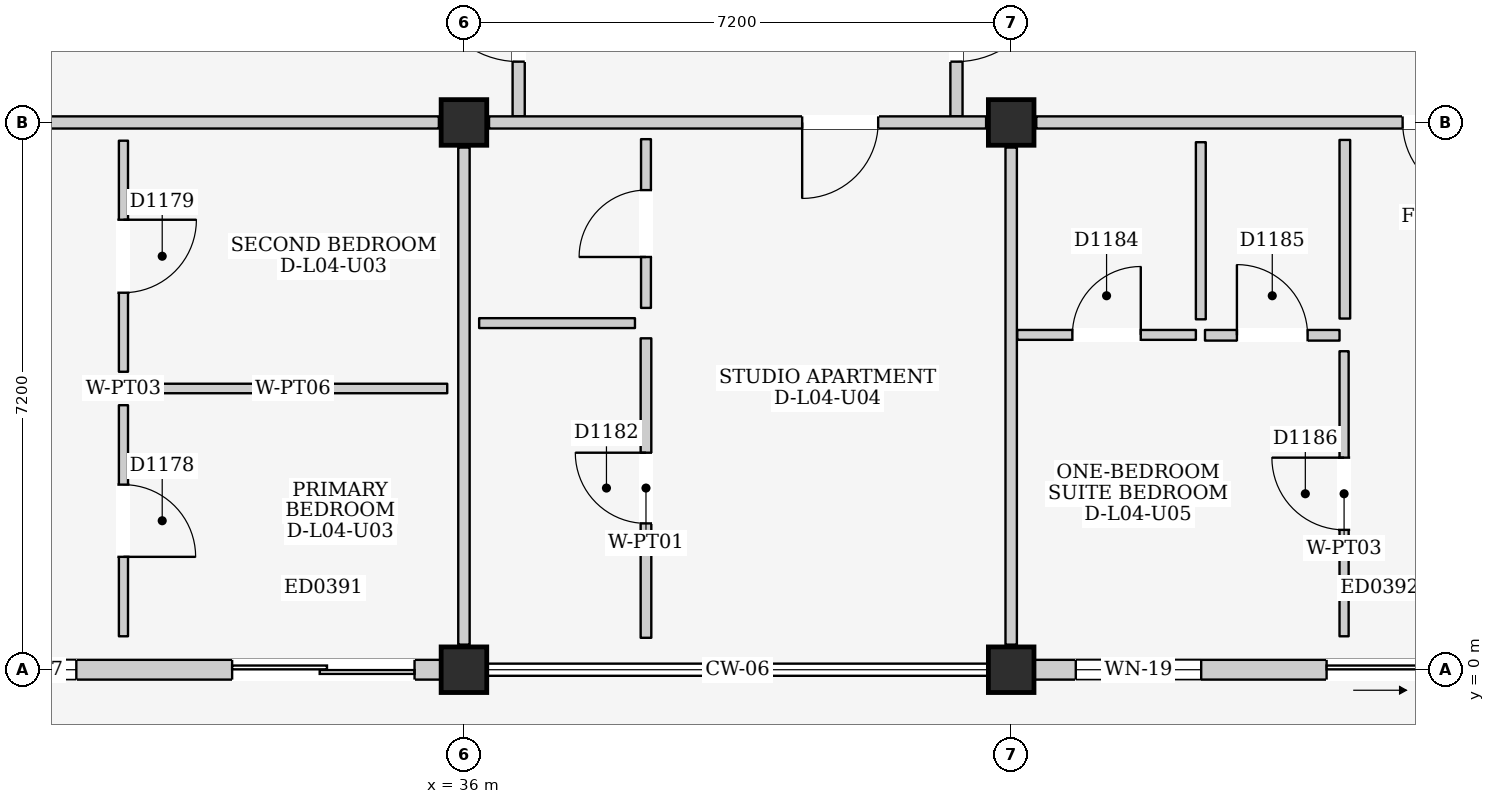
"""IFC4 building model, lengths in metres.
Left out: names, types, materials, properties, quantities, classifications, styles, units other than length and angle.
Written with IfcOpenShell. Run it as: python <this file> out.ifc"""

import sys

from ifc_helpers import new_model, si_unit, direction, frame, frame_2d, origin, origin_2d, place, context, subcontext, project, spatial, rectangle, extrude, element, fill, save


model = new_model("IFC4")
c1 = context("Model", 3, precision=1e-05, world=origin(), true_north=direction((0.0, 1.0)))
c2 = subcontext(c1, "Body", "Model", "MODEL_VIEW")
j1 = project(units=[si_unit("LENGTHUNIT", "METRE"), si_unit("PLANEANGLEUNIT", "RADIAN")], contexts=[c1])
p1 = place(None, origin())
s1 = spatial("IfcSite", under=j1, at=p1, CompositionType="ELEMENT")
p2 = place(p1, origin())
s2 = spatial("IfcBuilding", under=s1, at=p2, CompositionType="ELEMENT")
p3 = place(p2, frame((0.0, 0.0, 15.4)))
s3 = spatial("IfcBuildingStorey", under=s2, at=p3, CompositionType="ELEMENT", Elevation=15.4)
for number, where, z_axis, x_axis in (
    (1, (36.0, 0.0, 0.0), (0.0, 0.0, 1.0), (1.0, 0.0, 0.0)),
    (2, (36.0, 7.2, 0.0), (0.0, 0.0, 1.0), (1.0, 0.0, 0.0)),
    (3, (43.2, 0.0, 0.0), (0.0, 0.0, 1.0), (1.0, 0.0, 0.0)),
    (4, (43.2, 7.2, 0.0), (0.0, 0.0, 1.0), (1.0, 0.0, 0.0)),
):
    element("IfcColumn", number, at=place(p3, frame(where, z_axis=z_axis, x_axis=x_axis)), inside=s3, PredefinedType="COLUMN", context=c2, shape_type="SweptSolid", body=[
        extrude(rectangle(XDim=0.6, YDim=0.6, at=origin_2d()), origin(), (0.0, 0.0, 1.0), 3.2),
    ])
p4 = place(p3, frame((29.1, 0.0, 0.0), z_axis=(0.0, 0.0, 1.0), x_axis=(1.0, 0.0, 0.0)))
e5 = element("IfcWall", 5, at=p4, inside=s3, PredefinedType="ELEMENTEDWALL", context=c2, shape_type="SweptSolid", body=[
    extrude(rectangle(XDim=6.6, YDim=0.26, at=frame_2d((3.3, 0.0))), origin(), (0.0, 0.0, 1.0), 2.43),
])
p5 = place(p4, frame((3.85, 0.0, 0.0)))
e6 = element("IfcOpeningElement", 6, at=p5, cuts=e5, PredefinedType="OPENING", context=c2, shape_type="SweptSolid", body=[
    extrude(rectangle(XDim=2.4, YDim=2.12, at=frame_2d((1.2, 1.06))), frame((0.0, 0.145, 0.0), z_axis=(0.0, -1.0, 0.0), x_axis=(1.0, 0.0, 0.0)), (0.0, 0.0, 1.0), 0.29),
])
p6 = place(p4, frame((0.55, 0.0, 0.9)))
e7 = element("IfcOpeningElement", 7, at=p6, cuts=e5, PredefinedType="OPENING", context=c2, shape_type="SweptSolid", body=[
    extrude(rectangle(XDim=1.25, YDim=1.3, at=frame_2d((0.625, 0.65))), frame((0.0, 0.145, 0.0), z_axis=(0.0, -1.0, 0.0), x_axis=(1.0, 0.0, 0.0)), (0.0, 0.0, 1.0), 0.29),
])
p7 = place(p3, frame((43.5, 0.0, 0.0), z_axis=(0.0, 0.0, 1.0), x_axis=(1.0, 0.0, 0.0)))
e8 = element("IfcWall", 8, at=p7, inside=s3, PredefinedType="ELEMENTEDWALL", context=c2, shape_type="SweptSolid", body=[
    extrude(rectangle(XDim=6.6, YDim=0.26, at=frame_2d((3.3, 0.0))), origin(), (0.0, 0.0, 1.0), 2.43),
])
p8 = place(p7, frame((3.85, 0.0, 0.0)))
e9 = element("IfcOpeningElement", 9, at=p8, cuts=e8, PredefinedType="OPENING", context=c2, shape_type="SweptSolid", body=[
    extrude(rectangle(XDim=1.4, YDim=2.1, at=frame_2d((0.7, 1.05))), frame((0.0, 0.145, 0.0), z_axis=(0.0, -1.0, 0.0), x_axis=(1.0, 0.0, 0.0)), (0.0, 0.0, 1.0), 0.29),
])
p9 = place(p7, frame((0.55, 0.0, 0.9)))
e10 = element("IfcOpeningElement", 10, at=p9, cuts=e8, PredefinedType="OPENING", context=c2, shape_type="SweptSolid", body=[
    extrude(rectangle(XDim=1.65, YDim=1.35, at=frame_2d((0.825, 0.675))), frame((0.0, 0.145, 0.0), z_axis=(0.0, -1.0, 0.0), x_axis=(1.0, 0.0, 0.0)), (0.0, 0.0, 1.0), 0.29),
])
p10 = place(p3, frame((36.72, 7.28, 0.0), z_axis=(0.0, 0.0, 1.0), x_axis=(0.0, 1.0, 0.0)))
e11 = element("IfcWall", 11, at=p10, inside=s3, PredefinedType="PARTITIONING", context=c2, shape_type="SweptSolid", body=[
    extrude(rectangle(XDim=4.32, YDim=0.16, at=frame_2d((2.16, 0.0))), origin(), (0.0, 0.0, 1.0), 2.95),
])
p11 = place(p10, frame((0.72, 0.0, 0.0)))
e12 = element("IfcOpeningElement", 12, at=p11, cuts=e11, PredefinedType="OPENING", context=c2, shape_type="SweptSolid", body=[
    extrude(rectangle(XDim=1.2, YDim=2.2, at=frame_2d((0.6, 1.1))), frame((0.0, 0.095, 0.0), z_axis=(0.0, -1.0, 0.0), x_axis=(1.0, 0.0, 0.0)), (0.0, 0.0, 1.0), 0.19),
])
p12 = place(p3, frame((42.48, 7.28, 0.0), z_axis=(0.0, 0.0, 1.0), x_axis=(0.0, 1.0, 0.0)))
e13 = element("IfcWall", 13, at=p12, inside=s3, PredefinedType="PARTITIONING", context=c2, shape_type="SweptSolid", body=[
    extrude(rectangle(XDim=4.32, YDim=0.16, at=frame_2d((2.16, 0.0))), origin(), (0.0, 0.0, 1.0), 2.95),
])
p13 = place(p12, frame((0.72, 0.0, 0.0)))
e14 = element("IfcOpeningElement", 14, at=p13, cuts=e13, PredefinedType="OPENING", context=c2, shape_type="SweptSolid", body=[
    extrude(rectangle(XDim=1.2, YDim=2.2, at=frame_2d((0.6, 1.1))), frame((0.0, 0.095, 0.0), z_axis=(0.0, -1.0, 0.0), x_axis=(1.0, 0.0, 0.0)), (0.0, 0.0, 1.0), 0.19),
])
p14 = place(p3, frame((29.13, 7.2, 0.0), z_axis=(0.0, 0.0, 1.0), x_axis=(1.0, 0.0, 0.0)))
e15 = element("IfcWall", 15, at=p14, inside=s3, PredefinedType="PARTITIONING", context=c2, shape_type="SweptSolid", body=[
    extrude(rectangle(XDim=6.54, YDim=0.16, at=frame_2d((3.27, 0.0))), origin(), (0.0, 0.0, 1.0), 2.335),
])
p15 = place(p14, frame((0.18, 0.0, 0.0)))
e16 = element("IfcOpeningElement", 16, at=p15, cuts=e15, PredefinedType="OPENING", context=c2, shape_type="SweptSolid", body=[
    extrude(rectangle(XDim=1.0, YDim=2.15, at=frame_2d((0.5, 1.075))), frame((0.0, 0.095, 0.0), z_axis=(0.0, -1.0, 0.0), x_axis=(1.0, 0.0, 0.0)), (0.0, 0.0, 1.0), 0.19),
])
p16 = place(p3, frame((36.0, 0.33, 0.0), z_axis=(0.0, 0.0, 1.0), x_axis=(0.0, 1.0, 0.0)))
e17 = element("IfcWall", 17, at=p16, inside=s3, PredefinedType="PARTITIONING", context=c2, shape_type="SweptSolid", body=[
    extrude(rectangle(XDim=6.54, YDim=0.15, at=frame_2d((3.27, 0.0))), origin(), (0.0, 0.0, 1.0), 2.385),
])
p17 = place(p3, frame((31.52, 0.44, 0.0), z_axis=(0.0, 0.0, 1.0), x_axis=(0.0, 1.0, 0.0)))
e18 = element("IfcWall", 18, at=p17, inside=s3, PredefinedType="PARTITIONING", context=c2, shape_type="SweptSolid", body=[
    extrude(rectangle(XDim=3.04, YDim=0.12, at=frame_2d((1.52, 0.0))), origin(), (0.0, 0.0, 1.0), 2.95),
])
p18 = place(p17, frame((1.045, 0.0, 0.0)))
e19 = element("IfcOpeningElement", 19, at=p18, cuts=e18, PredefinedType="OPENING", context=c2, shape_type="SweptSolid", body=[
    extrude(rectangle(XDim=0.95, YDim=2.15, at=frame_2d((0.475, 1.075))), frame((0.0, 0.075, 0.0), z_axis=(0.0, -1.0, 0.0), x_axis=(1.0, 0.0, 0.0)), (0.0, 0.0, 1.0), 0.15),
])
p19 = place(p3, frame((31.72, 3.7, 0.0), z_axis=(0.0, 0.0, 1.0), x_axis=(1.0, 0.0, 0.0)))
e20 = element("IfcWall", 20, at=p19, inside=s3, PredefinedType="PARTITIONING", context=c2, shape_type="SweptSolid", body=[
    extrude(rectangle(XDim=4.06, YDim=0.125, at=frame_2d((2.03, 0.0))), origin(), (0.0, 0.0, 1.0), 2.95),
])
p20 = place(p3, frame((31.52, 3.92, 0.0), z_axis=(0.0, 0.0, 1.0), x_axis=(0.0, 1.0, 0.0)))
e21 = element("IfcWall", 21, at=p20, inside=s3, PredefinedType="PARTITIONING", context=c2, shape_type="SweptSolid", body=[
    extrude(rectangle(XDim=3.04, YDim=0.12, at=frame_2d((1.52, 0.0))), origin(), (0.0, 0.0, 1.0), 2.95),
])
p21 = place(p20, frame((1.04, 0.0, 0.0)))
e22 = element("IfcOpeningElement", 22, at=p21, cuts=e21, PredefinedType="OPENING", context=c2, shape_type="SweptSolid", body=[
    extrude(rectangle(XDim=0.96, YDim=2.15, at=frame_2d((0.48, 1.075))), frame((0.0, 0.075, 0.0), z_axis=(0.0, -1.0, 0.0), x_axis=(1.0, 0.0, 0.0)), (0.0, 0.0, 1.0), 0.15),
])
p22 = place(p3, frame((36.33, 7.2, 0.0), z_axis=(0.0, 0.0, 1.0), x_axis=(1.0, 0.0, 0.0)))
e23 = element("IfcWall", 23, at=p22, inside=s3, PredefinedType="PARTITIONING", context=c2, shape_type="SweptSolid", body=[
    extrude(rectangle(XDim=6.54, YDim=0.16, at=frame_2d((3.27, 0.0))), origin(), (0.0, 0.0, 1.0), 2.335),
])
p23 = place(p22, frame((4.12, 0.0, 0.0)))
e24 = element("IfcOpeningElement", 24, at=p23, cuts=e23, PredefinedType="OPENING", context=c2, shape_type="SweptSolid", body=[
    extrude(rectangle(XDim=1.0, YDim=2.15, at=frame_2d((0.5, 1.075))), frame((0.0, 0.095, 0.0), z_axis=(0.0, -1.0, 0.0), x_axis=(1.0, 0.0, 0.0)), (0.0, 0.0, 1.0), 0.19),
])
p24 = place(p3, frame((43.2, 0.33, 0.0), z_axis=(0.0, 0.0, 1.0), x_axis=(0.0, 1.0, 0.0)))
e25 = element("IfcWall", 25, at=p24, inside=s3, PredefinedType="PARTITIONING", context=c2, shape_type="SweptSolid", body=[
    extrude(rectangle(XDim=6.54, YDim=0.15, at=frame_2d((3.27, 0.0))), origin(), (0.0, 0.0, 1.0), 2.385),
])
p25 = place(p3, frame((36.2, 4.56, 0.0), z_axis=(0.0, 0.0, 1.0), x_axis=(1.0, 0.0, 0.0)))
e26 = element("IfcWall", 26, at=p25, inside=s3, PredefinedType="PARTITIONING", context=c2, shape_type="SweptSolid", body=[
    extrude(rectangle(XDim=2.05, YDim=0.13, at=frame_2d((1.025, 0.0))), origin(), (0.0, 0.0, 1.0), 2.95),
])
p26 = place(p3, frame((38.395, 4.76, 0.0), z_axis=(0.0, 0.0, 1.0), x_axis=(0.0, 1.0, 0.0)))
e27 = element("IfcWall", 27, at=p26, inside=s3, PredefinedType="PARTITIONING", context=c2, shape_type="SweptSolid", body=[
    extrude(rectangle(XDim=2.22, YDim=0.13, at=frame_2d((1.11, 0.0))), origin(), (0.0, 0.0, 1.0), 2.95),
])
p27 = place(p26, frame((0.67, 0.0, 0.0)))
e28 = element("IfcOpeningElement", 28, at=p27, cuts=e27, PredefinedType="OPENING", context=c2, shape_type="SweptSolid", body=[
    extrude(rectangle(XDim=0.88, YDim=2.1, at=frame_2d((0.44, 1.05))), frame((0.0, 0.08, 0.0), z_axis=(0.0, -1.0, 0.0), x_axis=(1.0, 0.0, 0.0)), (0.0, 0.0, 1.0), 0.16),
])
p28 = place(p3, frame((38.395, 0.42, 0.0), z_axis=(0.0, 0.0, 1.0), x_axis=(0.0, 1.0, 0.0)))
e29 = element("IfcWall", 29, at=p28, inside=s3, PredefinedType="PARTITIONING", context=c2, shape_type="SweptSolid", body=[
    extrude(rectangle(XDim=3.94, YDim=0.14, at=frame_2d((1.97, 0.0))), origin(), (0.0, 0.0, 1.0), 2.95),
])
p29 = place(p28, frame((1.505, 0.0, 0.0)))
e30 = element("IfcOpeningElement", 30, at=p29, cuts=e29, PredefinedType="OPENING", context=c2, shape_type="SweptSolid", body=[
    extrude(rectangle(XDim=0.93, YDim=2.14, at=frame_2d((0.465, 1.07))), frame((0.0, 0.085, 0.0), z_axis=(0.0, -1.0, 0.0), x_axis=(1.0, 0.0, 0.0)), (0.0, 0.0, 1.0), 0.17),
])
p30 = place(p3, frame((43.53, 7.2, 0.0), z_axis=(0.0, 0.0, 1.0), x_axis=(1.0, 0.0, 0.0)))
e31 = element("IfcWall", 31, at=p30, inside=s3, PredefinedType="PARTITIONING", context=c2, shape_type="SweptSolid", body=[
    extrude(rectangle(XDim=6.54, YDim=0.16, at=frame_2d((3.27, 0.0))), origin(), (0.0, 0.0, 1.0), 2.335),
])
p31 = place(p30, frame((4.82, 0.0, 0.0)))
e32 = element("IfcOpeningElement", 32, at=p31, cuts=e31, PredefinedType="OPENING", context=c2, shape_type="SweptSolid", body=[
    extrude(rectangle(XDim=1.0, YDim=2.15, at=frame_2d((0.5, 1.075))), frame((0.0, 0.095, 0.0), z_axis=(0.0, -1.0, 0.0), x_axis=(1.0, 0.0, 0.0)), (0.0, 0.0, 1.0), 0.19),
])
p32 = place(p3, frame((43.28, 4.405, 0.0), z_axis=(0.0, 0.0, 1.0), x_axis=(1.0, 0.0, 0.0)))
e33 = element("IfcWall", 33, at=p32, inside=s3, PredefinedType="PARTITIONING", context=c2, shape_type="SweptSolid", body=[
    extrude(rectangle(XDim=2.35, YDim=0.13, at=frame_2d((1.175, 0.0))), origin(), (0.0, 0.0, 1.0), 2.95),
])
p33 = place(p32, frame((0.725, 0.0, 0.0)))
e34 = element("IfcOpeningElement", 34, at=p33, cuts=e33, PredefinedType="OPENING", context=c2, shape_type="SweptSolid", body=[
    extrude(rectangle(XDim=0.9, YDim=2.1, at=frame_2d((0.45, 1.05))), frame((0.0, 0.08, 0.0), z_axis=(0.0, -1.0, 0.0), x_axis=(1.0, 0.0, 0.0)), (0.0, 0.0, 1.0), 0.16),
])
p34 = place(p3, frame((45.695, 4.61, 0.0), z_axis=(0.0, 0.0, 1.0), x_axis=(0.0, 1.0, 0.0)))
e35 = element("IfcWall", 35, at=p34, inside=s3, PredefinedType="PARTITIONING", context=c2, shape_type="SweptSolid", body=[
    extrude(rectangle(XDim=2.33, YDim=0.13, at=frame_2d((1.165, 0.0))), origin(), (0.0, 0.0, 1.0), 2.95),
])
p35 = place(p3, frame((45.75, 4.4, 0.0), z_axis=(0.0, 0.0, 1.0), x_axis=(1.0, 0.0, 0.0)))
e36 = element("IfcWall", 36, at=p35, inside=s3, PredefinedType="PARTITIONING", context=c2, shape_type="SweptSolid", body=[
    extrude(rectangle(XDim=1.77, YDim=0.14, at=frame_2d((0.885, 0.0))), origin(), (0.0, 0.0, 1.0), 2.95),
])
p36 = place(p35, frame((0.42, 0.0, 0.0)))
e37 = element("IfcOpeningElement", 37, at=p36, cuts=e36, PredefinedType="OPENING", context=c2, shape_type="SweptSolid", body=[
    extrude(rectangle(XDim=0.93, YDim=2.14, at=frame_2d((0.465, 1.07))), frame((0.0, 0.085, 0.0), z_axis=(0.0, -1.0, 0.0), x_axis=(1.0, 0.0, 0.0)), (0.0, 0.0, 1.0), 0.17),
])
p37 = place(p3, frame((47.59, 4.62, 0.0), z_axis=(0.0, 0.0, 1.0), x_axis=(0.0, 1.0, 0.0)))
e38 = element("IfcWall", 38, at=p37, inside=s3, PredefinedType="PARTITIONING", context=c2, shape_type="SweptSolid", body=[
    extrude(rectangle(XDim=2.35, YDim=0.14, at=frame_2d((1.175, 0.0))), origin(), (0.0, 0.0, 1.0), 2.95),
])
p38 = place(p3, frame((47.58, 0.44, 0.0), z_axis=(0.0, 0.0, 1.0), x_axis=(0.0, 1.0, 0.0)))
e39 = element("IfcWall", 39, at=p38, inside=s3, PredefinedType="PARTITIONING", context=c2, shape_type="SweptSolid", body=[
    extrude(rectangle(XDim=3.75, YDim=0.12, at=frame_2d((1.875, 0.0))), origin(), (0.0, 0.0, 1.0), 2.95),
])
p39 = place(p38, frame((1.4, 0.0, 0.0)))
e40 = element("IfcOpeningElement", 40, at=p39, cuts=e39, PredefinedType="OPENING", context=c2, shape_type="SweptSolid", body=[
    extrude(rectangle(XDim=0.95, YDim=2.15, at=frame_2d((0.475, 1.075))), frame((0.0, 0.075, 0.0), z_axis=(0.0, -1.0, 0.0), x_axis=(1.0, 0.0, 0.0)), (0.0, 0.0, 1.0), 0.15),
])
p40 = place(p5, frame((2.4, 0.0, 0.0), z_axis=(0.0, 0.0, 1.0), x_axis=(-1.0, 0.0, 0.0)))
e41 = element("IfcDoor", 41, at=p40, inside=s3, OperationType="DOUBLE_DOOR_SLIDING", PredefinedType="DOOR", context=c2, shape_type="SweptSolid", body=[
    extrude(rectangle(XDim=2.4, YDim=2.12, at=frame_2d((1.2, 1.06))), frame((0.0, 0.025, 0.0), z_axis=(0.0, -1.0, 0.0), x_axis=(1.0, 0.0, 0.0)), (0.0, 0.0, 1.0), 0.05),
])
fill(e6, e41)
p41 = place(p6, origin())
e42 = element("IfcWindow", 42, at=p41, inside=s3, PartitioningType="SINGLE_PANEL", PredefinedType="WINDOW", context=c2, shape_type="SweptSolid", body=[
    extrude(rectangle(XDim=1.25, YDim=1.3, at=frame_2d((0.625, 0.65))), frame((0.0, 0.03, 0.0), z_axis=(0.0, -1.0, 0.0), x_axis=(1.0, 0.0, 0.0)), (0.0, 0.0, 1.0), 0.06),
])
fill(e7, e42)
p42 = place(p8, frame((1.4, 0.0, 0.0), z_axis=(0.0, 0.0, 1.0), x_axis=(-1.0, 0.0, 0.0)))
e43 = element("IfcDoor", 43, at=p42, inside=s3, OperationType="SLIDING_TO_RIGHT", PredefinedType="DOOR", context=c2, shape_type="SweptSolid", body=[
    extrude(rectangle(XDim=1.4, YDim=2.1, at=frame_2d((0.7, 1.05))), frame((0.0, 0.025, 0.0), z_axis=(0.0, -1.0, 0.0), x_axis=(1.0, 0.0, 0.0)), (0.0, 0.0, 1.0), 0.05),
])
fill(e9, e43)
p43 = place(p9, origin())
e44 = element("IfcWindow", 44, at=p43, inside=s3, PartitioningType="DOUBLE_PANEL_VERTICAL", PredefinedType="WINDOW", context=c2, shape_type="SweptSolid", body=[
    extrude(rectangle(XDim=1.65, YDim=1.35, at=frame_2d((0.825, 0.675))), frame((0.0, 0.03, 0.0), z_axis=(0.0, -1.0, 0.0), x_axis=(1.0, 0.0, 0.0)), (0.0, 0.0, 1.0), 0.06),
])
fill(e10, e44)
p44 = place(p11, origin())
e45 = element("IfcDoor", 45, at=p44, inside=s3, OperationType="SINGLE_SWING_RIGHT", PredefinedType="DOOR", context=c2, shape_type="SweptSolid", body=[
    extrude(rectangle(XDim=1.2, YDim=2.2, at=frame_2d((0.6, 1.1))), frame((0.0, 0.025, 0.0), z_axis=(0.0, -1.0, 0.0), x_axis=(1.0, 0.0, 0.0)), (0.0, 0.0, 1.0), 0.05),
])
fill(e12, e45)
p45 = place(p13, frame((1.2, 0.0, 0.0), z_axis=(0.0, 0.0, 1.0), x_axis=(-1.0, 0.0, 0.0)))
e46 = element("IfcDoor", 46, at=p45, inside=s3, OperationType="SINGLE_SWING_LEFT", PredefinedType="DOOR", context=c2, shape_type="SweptSolid", body=[
    extrude(rectangle(XDim=1.2, YDim=2.2, at=frame_2d((0.6, 1.1))), frame((0.0, 0.025, 0.0), z_axis=(0.0, -1.0, 0.0), x_axis=(1.0, 0.0, 0.0)), (0.0, 0.0, 1.0), 0.05),
])
fill(e14, e46)
p46 = place(p18, frame((0.95, 0.0, 0.0), z_axis=(0.0, 0.0, 1.0), x_axis=(-1.0, 0.0, 0.0)))
e47 = element("IfcDoor", 47, at=p46, inside=s3, OperationType="SINGLE_SWING_RIGHT", PredefinedType="DOOR", context=c2, shape_type="SweptSolid", body=[
    extrude(rectangle(XDim=0.95, YDim=2.15, at=frame_2d((0.475, 1.075))), frame((0.0, 0.025, 0.0), z_axis=(0.0, -1.0, 0.0), x_axis=(1.0, 0.0, 0.0)), (0.0, 0.0, 1.0), 0.05),
])
fill(e19, e47)
p47 = place(p21, frame((0.96, 0.0, 0.0), z_axis=(0.0, 0.0, 1.0), x_axis=(-1.0, 0.0, 0.0)))
e48 = element("IfcDoor", 48, at=p47, inside=s3, OperationType="SINGLE_SWING_LEFT", PredefinedType="DOOR", context=c2, shape_type="SweptSolid", body=[
    extrude(rectangle(XDim=0.96, YDim=2.15, at=frame_2d((0.48, 1.075))), frame((0.0, 0.025, 0.0), z_axis=(0.0, -1.0, 0.0), x_axis=(1.0, 0.0, 0.0)), (0.0, 0.0, 1.0), 0.05),
])
fill(e22, e48)
p48 = place(p23, frame((1.0, 0.0, 0.0), z_axis=(0.0, 0.0, 1.0), x_axis=(-1.0, 0.0, 0.0)))
e49 = element("IfcDoor", 49, at=p48, inside=s3, OperationType="SINGLE_SWING_RIGHT", PredefinedType="DOOR", context=c2, shape_type="SweptSolid", body=[
    extrude(rectangle(XDim=1.0, YDim=2.15, at=frame_2d((0.5, 1.075))), frame((0.0, 0.025, 0.0), z_axis=(0.0, -1.0, 0.0), x_axis=(1.0, 0.0, 0.0)), (0.0, 0.0, 1.0), 0.05),
])
fill(e24, e49)
p49 = place(p27, origin())
e50 = element("IfcDoor", 50, at=p49, inside=s3, OperationType="SINGLE_SWING_LEFT", PredefinedType="DOOR", context=c2, shape_type="SweptSolid", body=[
    extrude(rectangle(XDim=0.88, YDim=2.1, at=frame_2d((0.44, 1.05))), frame((0.0, 0.025, 0.0), z_axis=(0.0, -1.0, 0.0), x_axis=(1.0, 0.0, 0.0)), (0.0, 0.0, 1.0), 0.05),
])
fill(e28, e50)
p50 = place(p29, origin())
e51 = element("IfcDoor", 51, at=p50, inside=s3, OperationType="SINGLE_SWING_RIGHT", PredefinedType="DOOR", context=c2, shape_type="SweptSolid", body=[
    extrude(rectangle(XDim=0.93, YDim=2.14, at=frame_2d((0.465, 1.07))), frame((0.0, 0.025, 0.0), z_axis=(0.0, -1.0, 0.0), x_axis=(1.0, 0.0, 0.0)), (0.0, 0.0, 1.0), 0.05),
])
fill(e30, e51)
p51 = place(p31, frame((1.0, 0.0, 0.0), z_axis=(0.0, 0.0, 1.0), x_axis=(-1.0, 0.0, 0.0)))
e52 = element("IfcDoor", 52, at=p51, inside=s3, OperationType="SINGLE_SWING_LEFT", PredefinedType="DOOR", context=c2, shape_type="SweptSolid", body=[
    extrude(rectangle(XDim=1.0, YDim=2.15, at=frame_2d((0.5, 1.075))), frame((0.0, 0.025, 0.0), z_axis=(0.0, -1.0, 0.0), x_axis=(1.0, 0.0, 0.0)), (0.0, 0.0, 1.0), 0.05),
])
fill(e32, e52)
p52 = place(p33, origin())
e53 = element("IfcDoor", 53, at=p52, inside=s3, OperationType="SINGLE_SWING_RIGHT", PredefinedType="DOOR", context=c2, shape_type="SweptSolid", body=[
    extrude(rectangle(XDim=0.9, YDim=2.1, at=frame_2d((0.45, 1.05))), frame((0.0, 0.025, 0.0), z_axis=(0.0, -1.0, 0.0), x_axis=(1.0, 0.0, 0.0)), (0.0, 0.0, 1.0), 0.05),
])
fill(e34, e53)
p53 = place(p36, origin())
e54 = element("IfcDoor", 54, at=p53, inside=s3, OperationType="SINGLE_SWING_LEFT", PredefinedType="DOOR", context=c2, shape_type="SweptSolid", body=[
    extrude(rectangle(XDim=0.93, YDim=2.14, at=frame_2d((0.465, 1.07))), frame((0.0, 0.025, 0.0), z_axis=(0.0, -1.0, 0.0), x_axis=(1.0, 0.0, 0.0)), (0.0, 0.0, 1.0), 0.05),
])
fill(e37, e54)
p54 = place(p39, origin())
e55 = element("IfcDoor", 55, at=p54, inside=s3, OperationType="SINGLE_SWING_RIGHT", PredefinedType="DOOR", context=c2, shape_type="SweptSolid", body=[
    extrude(rectangle(XDim=0.95, YDim=2.15, at=frame_2d((0.475, 1.075))), frame((0.0, 0.025, 0.0), z_axis=(0.0, -1.0, 0.0), x_axis=(1.0, 0.0, 0.0)), (0.0, 0.0, 1.0), 0.05),
])
fill(e40, e55)
save(model, sys.argv[1])
